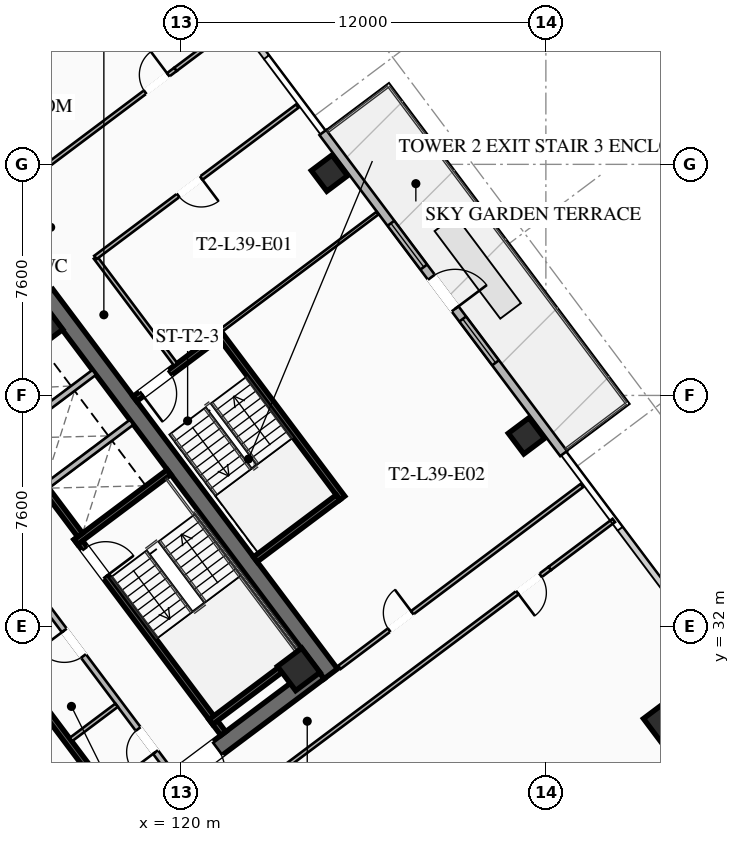
"""IFC4 building model, lengths in metres.
Left out: names, types, materials, properties, quantities, classifications, styles, units other than length and angle.
Written with IfcOpenShell. Run it as: python <this file> out.ifc"""

import sys

from ifc_helpers import new_model, si_unit, direction, frame, frame_2d, origin, origin_2d, place, context, subcontext, project, spatial, rectangle, hollow_rectangle, extrude, element, fill, save


model = new_model("IFC4")
c1 = context("Model", 3, precision=1e-05, world=origin(), true_north=direction((0.0, 1.0)))
c2 = subcontext(c1, "Body", "Model", "MODEL_VIEW")
j1 = project(units=[si_unit("LENGTHUNIT", "METRE"), si_unit("PLANEANGLEUNIT", "RADIAN")], contexts=[c1])
p1 = place(None, origin())
s1 = spatial("IfcSite", under=j1, at=p1, CompositionType="ELEMENT")
p2 = place(p1, origin())
s2 = spatial("IfcBuilding", under=s1, at=p2, CompositionType="ELEMENT")
p3 = place(p2, frame((0.0, 0.0, 146.35)))
s3 = spatial("IfcBuildingStorey", under=s2, at=p3, CompositionType="ELEMENT", Elevation=146.35)
p4 = place(p3, frame((115.564, 42.923, 0.0), z_axis=(0.0, 0.0, 1.0), x_axis=(0.600005007985, -0.799996243986, 0.0)))
e1 = element("IfcWall", 1, at=p4, inside=s3, PredefinedType="SHEAR", context=c2, shape_type="SweptSolid", body=[
    extrude(rectangle(XDim=15.6, YDim=0.55, at=frame_2d((7.8, 0.0))), origin(), (0.0, 0.0, 1.0), 3.55),
])
p5 = place(p3, frame((124.539, 30.498, 0.0), z_axis=(0.0, 0.0, 1.0), x_axis=(-0.799998054672, -0.600002593761, 0.0)))
e2 = element("IfcWall", 2, at=p5, inside=s3, PredefinedType="SHEAR", context=c2, shape_type="SweptSolid", body=[
    extrude(rectangle(XDim=15.06, YDim=0.55, at=frame_2d((7.53, 0.0))), origin(), (0.0, 0.0, 1.0), 3.55),
])
p6 = place(p5, frame((9.23, 0.0, 0.0)))
e3 = element("IfcOpeningElement", 3, at=p6, cuts=e2, PredefinedType="OPENING", context=c2, shape_type="SweptSolid", body=[
    extrude(rectangle(XDim=1.25, YDim=2.25, at=frame_2d((0.625, 1.125))), frame((0.0, 0.285, 0.0), z_axis=(0.0, -1.0, 0.0), x_axis=(1.0, 0.0, 0.0)), (0.0, 0.0, 1.0), 0.57),
])
p7 = place(p5, frame((4.18, 0.0, 0.0)))
e4 = element("IfcOpeningElement", 4, at=p7, cuts=e2, PredefinedType="OPENING", context=c2, shape_type="SweptSolid", body=[
    extrude(rectangle(XDim=1.25, YDim=2.25, at=frame_2d((0.625, 1.125))), frame((0.0, 0.285, 0.0), z_axis=(0.0, -1.0, 0.0), x_axis=(1.0, 0.0, 0.0)), (0.0, 0.0, 1.0), 0.57),
])
for number, where, z_axis, x_axis in (
    (5, (123.87, 30.59, 0.0), (0.0, 0.0, 1.0), (0.8, 0.6, 0.0)),
    (6, (115.41, 41.87, 0.0), (0.0, 0.0, 1.0), (0.8, 0.6, 0.0)),
):
    element("IfcColumn", number, at=place(p3, frame(where, z_axis=z_axis, x_axis=x_axis)), inside=s3, PredefinedType="COLUMN", context=c2, shape_type="SweptSolid", body=[
        extrude(hollow_rectangle(XDim=1.0, YDim=1.0, WallThickness=0.04, at=origin_2d()), origin(), (0.0, 0.0, 1.0), 3.37),
    ])
p8 = place(p3, frame((136.12, 28.84, 0.0), z_axis=(0.0, 0.0, 1.0), x_axis=(0.799999996291, 0.600000004945, 0.0)))
e7 = element("IfcColumn", 7, at=p8, inside=s3, PredefinedType="COLUMN", context=c2, shape_type="SweptSolid", body=[
    extrude(hollow_rectangle(XDim=1.3, YDim=1.3, WallThickness=0.05, at=origin_2d()), origin(), (0.0, 0.0, 1.0), 3.37),
])
for number, where, z_axis, x_axis in (
    (8, (131.36, 38.27, 0.0), (0.0, 0.0, 1.0), (0.8, 0.6, 0.0)),
    (9, (124.88, 46.91, 0.0), (0.0, 0.0, 1.0), (0.8, 0.6, 0.0)),
):
    element("IfcColumn", number, at=place(p3, frame(where, z_axis=z_axis, x_axis=x_axis)), inside=s3, PredefinedType="COLUMN", context=c2, shape_type="SweptSolid", body=[
        extrude(hollow_rectangle(XDim=0.85, YDim=0.85, WallThickness=0.035, at=origin_2d()), origin(), (0.0, 0.0, 1.0), 3.37),
    ])
p9 = place(p3, frame((124.664, 48.248, 0.0), z_axis=(0.0, 0.0, 1.0), x_axis=(0.599994081423, -0.800004438899, 0.0)))
e10 = element("IfcWall", 10, at=p9, inside=s3, PredefinedType="SOLIDWALL", context=c2, shape_type="SweptSolid", body=[
    extrude(rectangle(XDim=13.2, YDim=0.28, at=frame_2d((6.6, 0.0))), origin(), (0.0, 0.0, 1.0), 3.37),
])
p10 = place(p9, frame((5.95, 0.0, 0.0)))
e11 = element("IfcOpeningElement", 11, at=p10, cuts=e10, PredefinedType="OPENING", context=c2, shape_type="SweptSolid", body=[
    extrude(rectangle(XDim=1.3, YDim=2.15, at=frame_2d((0.65, 1.075))), frame((0.0, 0.15, 0.0), z_axis=(0.0, -1.0, 0.0), x_axis=(1.0, 0.0, 0.0)), (0.0, 0.0, 1.0), 0.3),
])
p11 = place(p9, frame((3.732, 0.0, 0.85)))
e12 = element("IfcOpeningElement", 12, at=p11, cuts=e10, PredefinedType="OPENING", context=c2, shape_type="SweptSolid", body=[
    extrude(rectangle(XDim=1.8, YDim=1.92, at=frame_2d((0.9, 0.96))), frame((0.0, 0.15, 0.0), z_axis=(0.0, -1.0, 0.0), x_axis=(1.0, 0.0, 0.0)), (0.0, 0.0, 1.0), 0.3),
])
p12 = place(p9, frame((7.668, 0.0, 0.85)))
e13 = element("IfcOpeningElement", 13, at=p12, cuts=e10, PredefinedType="OPENING", context=c2, shape_type="SweptSolid", body=[
    extrude(rectangle(XDim=1.8, YDim=1.92, at=frame_2d((0.9, 0.96))), frame((0.0, 0.15, 0.0), z_axis=(0.0, -1.0, 0.0), x_axis=(1.0, 0.0, 0.0)), (0.0, 0.0, 1.0), 0.3),
])
p13 = place(p3, frame((116.56, 34.92, 0.0), z_axis=(0.0, 0.0, 1.0), x_axis=(0.59999029481, -0.8000072788, 0.0)))
e14 = element("IfcWall", 14, at=p13, inside=s3, PredefinedType="SHEAR", context=c2, shape_type="SweptSolid", body=[
    extrude(rectangle(XDim=8.05, YDim=0.2, at=frame_2d((4.025, 0.0))), origin(), (0.0, 0.0, 1.0), 3.37),
])
p14 = place(p13, frame((0.45, 0.0, 0.0)))
e15 = element("IfcOpeningElement", 15, at=p14, cuts=e14, PredefinedType="OPENING", context=c2, shape_type="SweptSolid", body=[
    extrude(rectangle(XDim=1.15, YDim=2.2, at=frame_2d((0.575, 1.1))), frame((0.0, 0.11, 0.0), z_axis=(0.0, -1.0, 0.0), x_axis=(1.0, 0.0, 0.0)), (0.0, 0.0, 1.0), 0.22),
])
for number, where, z_axis, x_axis in (
    (16, (116.54, 34.78, 0.0), (0.0, 0.0, 1.0), (0.8, 0.6, 0.0)),
    (17, (120.98, 28.86, 0.0), (0.0, 0.0, 1.0), (0.8, 0.6, 0.0)),
):
    element("IfcWall", number, at=place(p3, frame(where, z_axis=z_axis, x_axis=x_axis)), inside=s3, PredefinedType="SHEAR", context=c2, shape_type="SweptSolid", body=[
        extrude(rectangle(XDim=3.83, YDim=0.2, at=frame_2d((1.915, 0.0))), origin(), (0.0, 0.0, 1.0), 3.37),
    ])
p15 = place(p3, frame((117.998, 25.936, 0.0), z_axis=(0.0, 0.0, 1.0), x_axis=(-0.600002693989, 0.799997979501, 0.0)))
e18 = element("IfcWall", 18, at=p15, inside=s3, PredefinedType="SHEAR", context=c2, shape_type="SweptSolid", body=[
    extrude(rectangle(XDim=14.5, YDim=0.2, at=frame_2d((7.25, 0.0))), origin(), (0.0, 0.0, 1.0), 3.37),
])
p16 = place(p3, frame((112.81, 40.17, 0.0), z_axis=(0.0, 0.0, 1.0), x_axis=(0.599993943644, -0.800004542231, 0.0)))
e19 = element("IfcWall", 19, at=p16, inside=s3, PredefinedType="SHEAR", context=c2, shape_type="SweptSolid", body=[
    extrude(rectangle(XDim=6.45, YDim=0.2, at=frame_2d((3.225, 0.0))), origin(), (0.0, 0.0, 1.0), 3.37),
])
for number, where, z_axis, x_axis in (
    (20, (115.59, 36.63, 0.0), (0.0, 0.0, 1.0), (0.8, 0.6, 0.0)),
    (21, (114.36, 38.27, 0.0), (0.0, 0.0, 1.0), (0.8, 0.6, 0.0)),
):
    element("IfcWall", number, at=place(p3, frame(where, z_axis=z_axis, x_axis=x_axis)), inside=s3, PredefinedType="SOLIDWALL", context=c2, shape_type="SweptSolid", body=[
        extrude(rectangle(XDim=3.48, YDim=0.2, at=frame_2d((1.74, 0.0))), origin(), (0.0, 0.0, 1.0), 3.37),
    ])
p17 = place(p3, frame((119.67, 27.19, 0.0), z_axis=(0.0, 0.0, 1.0), x_axis=(-0.599988677396, 0.800008491828, 0.0)))
e22 = element("IfcWall", 22, at=p17, inside=s3, PredefinedType="SOLIDWALL", context=c2, shape_type="SweptSolid", body=[
    extrude(rectangle(XDim=6.9, YDim=0.2, at=frame_2d((3.45, 0.0))), origin(), (0.0, 0.0, 1.0), 2.723),
])
p18 = place(p17, frame((0.85, 0.0, 0.0)))
e23 = element("IfcOpeningElement", 23, at=p18, cuts=e22, PredefinedType="OPENING", context=c2, shape_type="SweptSolid", body=[
    extrude(rectangle(XDim=0.95, YDim=2.05, at=frame_2d((0.475, 1.025))), frame((0.0, 0.11, 0.0), z_axis=(0.0, -1.0, 0.0), x_axis=(1.0, 0.0, 0.0)), (0.0, 0.0, 1.0), 0.22),
])
p19 = place(p17, frame((4.8, 0.0, 0.0)))
e24 = element("IfcOpeningElement", 24, at=p19, cuts=e22, PredefinedType="OPENING", context=c2, shape_type="SweptSolid", body=[
    extrude(rectangle(XDim=1.05, YDim=2.2, at=frame_2d((0.525, 1.1))), frame((0.0, 0.11, 0.0), z_axis=(0.0, -1.0, 0.0), x_axis=(1.0, 0.0, 0.0)), (0.0, 0.0, 1.0), 0.22),
])
p20 = place(p3, frame((116.376, 28.282, 0.0), z_axis=(0.0, 0.0, 1.0), x_axis=(0.8, 0.6, 0.0)))
e25 = element("IfcWall", 25, at=p20, inside=s3, PredefinedType="PARTITIONING", context=c2, shape_type="SweptSolid", body=[
    extrude(rectangle(XDim=1.88, YDim=0.135, at=frame_2d((0.94, 0.0))), origin(), (0.0, 0.0, 1.0), 2.723),
])
p21 = place(p3, frame((125.304, 36.228, 0.0), z_axis=(0.0, 0.0, 1.0), x_axis=(-0.59998851072, 0.800008616831, 0.0)))
e26 = element("IfcWall", 26, at=p21, inside=s3, PredefinedType="SHEAR", context=c2, shape_type="SweptSolid", body=[
    extrude(rectangle(XDim=6.8, YDim=0.2, at=frame_2d((3.4, 0.0))), origin(), (0.0, 0.0, 1.0), 3.37),
])
p22 = place(p3, frame((121.204, 41.528, 0.0), z_axis=(0.0, 0.0, 1.0), x_axis=(-0.800017232136, -0.599977023131, 0.0)))
e27 = element("IfcWall", 27, at=p22, inside=s3, PredefinedType="SHEAR", context=c2, shape_type="SweptSolid", body=[
    extrude(rectangle(XDim=3.4, YDim=0.2, at=frame_2d((1.7, 0.0))), origin(), (0.0, 0.0, 1.0), 3.37),
])
p23 = place(p22, frame((1.975, 0.0, 0.0)))
e28 = element("IfcOpeningElement", 28, at=p23, cuts=e27, PredefinedType="OPENING", context=c2, shape_type="SweptSolid", body=[
    extrude(rectangle(XDim=1.15, YDim=2.2, at=frame_2d((0.575, 1.1))), frame((0.0, 0.11, 0.0), z_axis=(0.0, -1.0, 0.0), x_axis=(1.0, 0.0, 0.0)), (0.0, 0.0, 1.0), 0.22),
])
p24 = place(p3, frame((122.444, 34.208, 0.0), z_axis=(0.0, 0.0, 1.0), x_axis=(0.79999138319, 0.600011488909, 0.0)))
e29 = element("IfcWall", 29, at=p24, inside=s3, PredefinedType="SHEAR", context=c2, shape_type="SweptSolid", body=[
    extrude(rectangle(XDim=3.4, YDim=0.2, at=frame_2d((1.7, 0.0))), origin(), (0.0, 0.0, 1.0), 3.37),
])
p25 = place(p3, frame((119.824, 40.618, 0.0), z_axis=(0.0, 0.0, 1.0), x_axis=(-0.599982243973, 0.800013316712, 0.0)))
e30 = element("IfcWall", 30, at=p25, inside=s3, PredefinedType="PARTITIONING", context=c2, shape_type="SweptSolid", body=[
    extrude(rectangle(XDim=4.4, YDim=0.135, at=frame_2d((2.2, 0.0))), origin(), (0.0, 0.0, 1.0), 2.723),
])
p26 = place(p3, frame((94.778, 31.546, 0.0), z_axis=(0.0, 0.0, 1.0), x_axis=(0.8, 0.6, 0.0)))
e31 = element("IfcWall", 31, at=p26, inside=s3, PredefinedType="PARTITIONING", context=c2, shape_type="SweptSolid", body=[
    extrude(rectangle(XDim=31.3, YDim=0.135, at=frame_2d((15.65, 0.0))), origin(), (0.0, 0.0, 1.0), 2.723),
])
p27 = place(p26, frame((0.3, 0.0, 0.0)))
e32 = element("IfcOpeningElement", 32, at=p27, cuts=e31, PredefinedType="OPENING", context=c2, shape_type="SweptSolid", body=[
    extrude(rectangle(XDim=0.95, YDim=2.05, at=frame_2d((0.475, 1.025))), frame((0.0, 0.077, 0.0), z_axis=(0.0, -1.0, 0.0), x_axis=(1.0, 0.0, 0.0)), (0.0, 0.0, 1.0), 0.155),
])
p28 = place(p26, frame((11.21, 0.0, 0.0)))
e33 = element("IfcOpeningElement", 33, at=p28, cuts=e31, PredefinedType="OPENING", context=c2, shape_type="SweptSolid", body=[
    extrude(rectangle(XDim=0.95, YDim=2.05, at=frame_2d((0.475, 1.025))), frame((0.0, 0.077, 0.0), z_axis=(0.0, -1.0, 0.0), x_axis=(1.0, 0.0, 0.0)), (0.0, 0.0, 1.0), 0.155),
])
p29 = place(p26, frame((15.487, 0.0, 0.0)))
e34 = element("IfcOpeningElement", 34, at=p29, cuts=e31, PredefinedType="OPENING", context=c2, shape_type="SweptSolid", body=[
    extrude(rectangle(XDim=0.95, YDim=2.05, at=frame_2d((0.475, 1.025))), frame((0.0, 0.077, 0.0), z_axis=(0.0, -1.0, 0.0), x_axis=(1.0, 0.0, 0.0)), (0.0, 0.0, 1.0), 0.155),
])
p30 = place(p26, frame((30.05, 0.0, 0.0)))
e35 = element("IfcOpeningElement", 35, at=p30, cuts=e31, PredefinedType="OPENING", context=c2, shape_type="SweptSolid", body=[
    extrude(rectangle(XDim=0.95, YDim=2.05, at=frame_2d((0.475, 1.025))), frame((0.0, 0.077, 0.0), z_axis=(0.0, -1.0, 0.0), x_axis=(1.0, 0.0, 0.0)), (0.0, 0.0, 1.0), 0.155),
])
p31 = place(p3, frame((119.818, 50.326, 0.0), z_axis=(0.0, 0.0, 1.0), x_axis=(0.799977721118, 0.600029704027, 0.0)))
e36 = element("IfcWall", 36, at=p31, inside=s3, PredefinedType="PARTITIONING", context=c2, shape_type="SweptSolid", body=[
    extrude(rectangle(XDim=2.63, YDim=0.135, at=frame_2d((1.315, 0.0))), origin(), (0.0, 0.0, 1.0), 2.723),
])
p32 = place(p3, frame((132.13, 33.91, 0.0), z_axis=(0.0, 0.0, 1.0), x_axis=(-0.799997191971, -0.600003744021, 0.0)))
e37 = element("IfcWall", 37, at=p32, inside=s3, PredefinedType="PARTITIONING", context=c2, shape_type="SweptSolid", body=[
    extrude(rectangle(XDim=31.3, YDim=0.135, at=frame_2d((15.65, 0.0))), origin(), (0.0, 0.0, 1.0), 2.723),
])
p33 = place(p32, frame((29.97, 0.0, 0.0)))
e38 = element("IfcOpeningElement", 38, at=p33, cuts=e37, PredefinedType="OPENING", context=c2, shape_type="SweptSolid", body=[
    extrude(rectangle(XDim=0.95, YDim=2.05, at=frame_2d((0.475, 1.025))), frame((0.0, 0.077, 0.0), z_axis=(0.0, -1.0, 0.0), x_axis=(1.0, 0.0, 0.0)), (0.0, 0.0, 1.0), 0.155),
])
p34 = place(p32, frame((0.38, 0.0, 0.0)))
e39 = element("IfcOpeningElement", 39, at=p34, cuts=e37, PredefinedType="OPENING", context=c2, shape_type="SweptSolid", body=[
    extrude(rectangle(XDim=0.95, YDim=2.05, at=frame_2d((0.475, 1.025))), frame((0.0, 0.077, 0.0), z_axis=(0.0, -1.0, 0.0), x_axis=(1.0, 0.0, 0.0)), (0.0, 0.0, 1.0), 0.155),
])
p35 = place(p3, frame((132.13, 33.91, 0.0), z_axis=(0.0, 0.0, 1.0), x_axis=(0.799977721118, 0.600029704027, 0.0)))
e40 = element("IfcWall", 40, at=p35, inside=s3, PredefinedType="PARTITIONING", context=c2, shape_type="SweptSolid", body=[
    extrude(rectangle(XDim=2.63, YDim=0.135, at=frame_2d((1.315, 0.0))), origin(), (0.0, 0.0, 1.0), 2.723),
])
p36 = place(p3, frame((123.824, 49.118, 0.0), z_axis=(0.0, 0.0, 1.0), x_axis=(-0.799996470201, -0.60000470637, 0.0)))
e41 = element("IfcWall", 41, at=p36, inside=s3, PredefinedType="PARTITIONING", context=c2, shape_type="SweptSolid", body=[
    extrude(rectangle(XDim=8.3, YDim=0.135, at=frame_2d((4.15, 0.0))), origin(), (0.0, 0.0, 1.0), 2.723),
])
p37 = place(p36, frame((3.95, 0.0, 0.0)))
e42 = element("IfcOpeningElement", 42, at=p37, cuts=e41, PredefinedType="OPENING", context=c2, shape_type="SweptSolid", body=[
    extrude(rectangle(XDim=0.95, YDim=2.05, at=frame_2d((0.475, 1.025))), frame((0.0, 0.077, 0.0), z_axis=(0.0, -1.0, 0.0), x_axis=(1.0, 0.0, 0.0)), (0.0, 0.0, 1.0), 0.155),
])
p38 = place(p3, frame((125.208, 30.656, 0.0), z_axis=(0.0, 0.0, 1.0), x_axis=(0.800005876956, 0.599992163979, 0.0)))
e43 = element("IfcWall", 43, at=p38, inside=s3, PredefinedType="PARTITIONING", context=c2, shape_type="SweptSolid", body=[
    extrude(rectangle(XDim=9.97, YDim=0.135, at=frame_2d((4.985, 0.0))), origin(), (0.0, 0.0, 1.0), 2.723),
])
p39 = place(p38, frame((2.045, 0.0, 0.0)))
e44 = element("IfcOpeningElement", 44, at=p39, cuts=e43, PredefinedType="OPENING", context=c2, shape_type="SweptSolid", body=[
    extrude(rectangle(XDim=0.95, YDim=2.05, at=frame_2d((0.475, 1.025))), frame((0.0, 0.077, 0.0), z_axis=(0.0, -1.0, 0.0), x_axis=(1.0, 0.0, 0.0)), (0.0, 0.0, 1.0), 0.155),
])
p40 = place(p3, frame((126.464, 45.598, 0.0), z_axis=(0.0, 0.0, 1.0), x_axis=(-0.8000181681, -0.599975775102, 0.0)))
e45 = element("IfcWall", 45, at=p40, inside=s3, PredefinedType="PARTITIONING", context=c2, shape_type="SweptSolid", body=[
    extrude(rectangle(XDim=6.45, YDim=0.11, at=frame_2d((3.225, 0.0))), origin(), (0.0, 0.0, 1.0), 2.723),
])
p41 = place(p10, origin())
e46 = element("IfcDoor", 46, at=p41, inside=s3, OperationType="SINGLE_SWING_RIGHT", PredefinedType="DOOR", context=c2, shape_type="SweptSolid", body=[
    extrude(rectangle(XDim=1.3, YDim=2.15, at=frame_2d((0.65, 1.075))), frame((0.0, 0.025, 0.0), z_axis=(0.0, -1.0, 0.0), x_axis=(1.0, 0.0, 0.0)), (0.0, 0.0, 1.0), 0.05),
])
fill(e11, e46)
p42 = place(p11, origin())
e47 = element("IfcWindow", 47, at=p42, inside=s3, PartitioningType="SINGLE_PANEL", PredefinedType="WINDOW", context=c2, shape_type="SweptSolid", body=[
    extrude(rectangle(XDim=1.8, YDim=1.92, at=frame_2d((0.9, 0.96))), frame((0.0, 0.03, 0.0), z_axis=(0.0, -1.0, 0.0), x_axis=(1.0, 0.0, 0.0)), (0.0, 0.0, 1.0), 0.06),
])
fill(e12, e47)
p43 = place(p12, origin())
e48 = element("IfcWindow", 48, at=p43, inside=s3, PartitioningType="SINGLE_PANEL", PredefinedType="WINDOW", context=c2, shape_type="SweptSolid", body=[
    extrude(rectangle(XDim=1.8, YDim=1.92, at=frame_2d((0.9, 0.96))), frame((0.0, 0.03, 0.0), z_axis=(0.0, -1.0, 0.0), x_axis=(1.0, 0.0, 0.0)), (0.0, 0.0, 1.0), 0.06),
])
fill(e13, e48)
p44 = place(p7, origin())
e49 = element("IfcDoor", 49, at=p44, inside=s3, OperationType="SINGLE_SWING_RIGHT", PredefinedType="DOOR", context=c2, shape_type="SweptSolid", body=[
    extrude(rectangle(XDim=1.25, YDim=2.25, at=frame_2d((0.625, 1.125))), frame((0.0, 0.025, 0.0), z_axis=(0.0, -1.0, 0.0), x_axis=(1.0, 0.0, 0.0)), (0.0, 0.0, 1.0), 0.05),
])
fill(e4, e49)
p45 = place(p14, origin())
e50 = element("IfcDoor", 50, at=p45, inside=s3, OperationType="SINGLE_SWING_RIGHT", PredefinedType="DOOR", context=c2, shape_type="SweptSolid", body=[
    extrude(rectangle(XDim=1.15, YDim=2.2, at=frame_2d((0.575, 1.1))), frame((0.0, 0.025, 0.0), z_axis=(0.0, -1.0, 0.0), x_axis=(1.0, 0.0, 0.0)), (0.0, 0.0, 1.0), 0.05),
])
fill(e15, e50)
p46 = place(p18, origin())
e51 = element("IfcDoor", 51, at=p46, inside=s3, OperationType="SINGLE_SWING_LEFT", PredefinedType="DOOR", context=c2, shape_type="SweptSolid", body=[
    extrude(rectangle(XDim=0.95, YDim=2.05, at=frame_2d((0.475, 1.025))), frame((0.0, 0.025, 0.0), z_axis=(0.0, -1.0, 0.0), x_axis=(1.0, 0.0, 0.0)), (0.0, 0.0, 1.0), 0.05),
])
fill(e23, e51)
p47 = place(p19, origin())
e52 = element("IfcDoor", 52, at=p47, inside=s3, OperationType="SINGLE_SWING_RIGHT", PredefinedType="DOOR", context=c2, shape_type="SweptSolid", body=[
    extrude(rectangle(XDim=1.05, YDim=2.2, at=frame_2d((0.525, 1.1))), frame((0.0, 0.025, 0.0), z_axis=(0.0, -1.0, 0.0), x_axis=(1.0, 0.0, 0.0)), (0.0, 0.0, 1.0), 0.05),
])
fill(e24, e52)
p48 = place(p23, origin())
e53 = element("IfcDoor", 53, at=p48, inside=s3, OperationType="SINGLE_SWING_RIGHT", PredefinedType="DOOR", context=c2, shape_type="SweptSolid", body=[
    extrude(rectangle(XDim=1.15, YDim=2.2, at=frame_2d((0.575, 1.1))), frame((0.0, 0.025, 0.0), z_axis=(0.0, -1.0, 0.0), x_axis=(1.0, 0.0, 0.0)), (0.0, 0.0, 1.0), 0.05),
])
fill(e28, e53)
p49 = place(p30, origin())
e54 = element("IfcDoor", 54, at=p49, inside=s3, OperationType="SINGLE_SWING_RIGHT", PredefinedType="DOOR", context=c2, shape_type="SweptSolid", body=[
    extrude(rectangle(XDim=0.95, YDim=2.05, at=frame_2d((0.475, 1.025))), frame((0.0, 0.025, 0.0), z_axis=(0.0, -1.0, 0.0), x_axis=(1.0, 0.0, 0.0)), (0.0, 0.0, 1.0), 0.05),
])
fill(e35, e54)
p50 = place(p34, origin())
e55 = element("IfcDoor", 55, at=p50, inside=s3, OperationType="SINGLE_SWING_RIGHT", PredefinedType="DOOR", context=c2, shape_type="SweptSolid", body=[
    extrude(rectangle(XDim=0.95, YDim=2.05, at=frame_2d((0.475, 1.025))), frame((0.0, 0.025, 0.0), z_axis=(0.0, -1.0, 0.0), x_axis=(1.0, 0.0, 0.0)), (0.0, 0.0, 1.0), 0.05),
])
fill(e39, e55)
p51 = place(p37, origin())
e56 = element("IfcDoor", 56, at=p51, inside=s3, OperationType="SINGLE_SWING_LEFT", PredefinedType="DOOR", context=c2, shape_type="SweptSolid", body=[
    extrude(rectangle(XDim=0.95, YDim=2.05, at=frame_2d((0.475, 1.025))), frame((0.0, 0.025, 0.0), z_axis=(0.0, -1.0, 0.0), x_axis=(1.0, 0.0, 0.0)), (0.0, 0.0, 1.0), 0.05),
])
fill(e42, e56)
p52 = place(p39, origin())
e57 = element("IfcDoor", 57, at=p52, inside=s3, OperationType="SINGLE_SWING_RIGHT", PredefinedType="DOOR", context=c2, shape_type="SweptSolid", body=[
    extrude(rectangle(XDim=0.95, YDim=2.05, at=frame_2d((0.475, 1.025))), frame((0.0, 0.025, 0.0), z_axis=(0.0, -1.0, 0.0), x_axis=(1.0, 0.0, 0.0)), (0.0, 0.0, 1.0), 0.05),
])
fill(e44, e57)
save(model, sys.argv[1])
